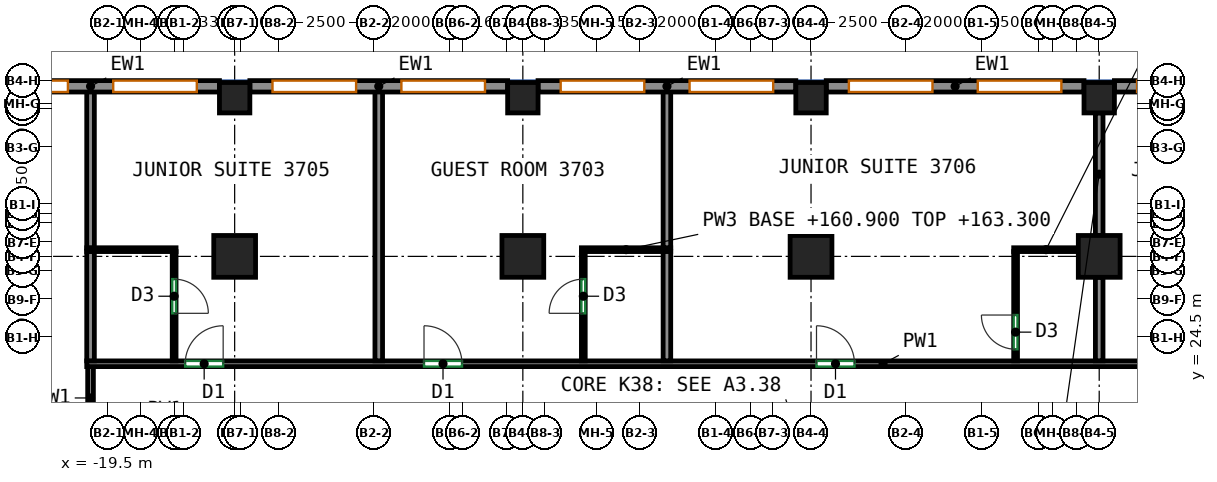
"""IFC4 building model, lengths in metres.
Left out: names, types, materials, properties, quantities, classifications, styles, units other than length and angle.
Written with IfcOpenShell. Run it as: python <this file> out.ifc"""

import sys

from ifc_helpers import new_model, si_unit, direction, frame, frame_2d, origin, origin_2d, place, context, subcontext, project, spatial, rectangle, extrude, source, transform, mapped, element, fill, save


model = new_model("IFC4")
c1 = context("Model", 3, precision=1e-05, world=origin(), true_north=direction((0.0, 1.0)))
c2 = subcontext(c1, "Body", "Model", "MODEL_VIEW")
j1 = project(units=[si_unit("LENGTHUNIT", "METRE"), si_unit("PLANEANGLEUNIT", "RADIAN")], contexts=[c1])
p1 = place(None, origin())
s1 = spatial("IfcSite", under=j1, at=p1, CompositionType="ELEMENT")
p2 = place(p1, origin())
s2 = spatial("IfcBuilding", under=s1, at=p2, CompositionType="ELEMENT")
p3 = place(p2, frame((0.0, 0.0, 160.9)))
s3 = spatial("IfcBuildingStorey", under=s2, at=p3, CompositionType="ELEMENT", Elevation=160.9)
m1 = source(origin(), c2, "Body", "SweptSolid", [
    extrude(rectangle(XDim=1.1, YDim=1.1, at=origin_2d()), origin(), (0.0, 0.0, 1.0), 3.0),
])
p4 = place(p3, frame((-16.167, 26.625, 0.0), z_axis=(0.0, 0.0, 1.0), x_axis=(1.0, 0.0, 0.0)))
e1 = element("IfcColumn", 1, at=p4, inside=s3, PredefinedType="COLUMN", context=c2, shape_type="MappedRepresentation", body=[
    mapped(m1, transform((0.0, 0.0, 0.0))),
])
m2 = source(origin(), c2, "Body", "SweptSolid", [
    extrude(rectangle(XDim=0.8, YDim=0.8, at=origin_2d()), origin(), (0.0, 0.0, 1.0), 3.0),
])
p5 = place(p3, frame((-16.167, 30.8, 0.0), z_axis=(0.0, 0.0, 1.0), x_axis=(1.0, 0.0, 0.0)))
e2 = element("IfcColumn", 2, at=p5, inside=s3, PredefinedType="COLUMN", context=c2, shape_type="MappedRepresentation", body=[
    mapped(m2, transform((0.0, 0.0, 0.0))),
])
p6 = place(p3, frame((-8.583, 26.625, 0.0), z_axis=(0.0, 0.0, 1.0), x_axis=(1.0, 0.0, 0.0)))
e3 = element("IfcColumn", 3, at=p6, inside=s3, PredefinedType="COLUMN", context=c2, shape_type="MappedRepresentation", body=[
    mapped(m1, transform((0.0, 0.0, 0.0))),
])
p7 = place(p3, frame((-8.583, 30.8, 0.0), z_axis=(0.0, 0.0, 1.0), x_axis=(1.0, 0.0, 0.0)))
e4 = element("IfcColumn", 4, at=p7, inside=s3, PredefinedType="COLUMN", context=c2, shape_type="MappedRepresentation", body=[
    mapped(m2, transform((0.0, 0.0, 0.0))),
])
p8 = place(p3, frame((-1.0, 26.625, 0.0), z_axis=(0.0, 0.0, 1.0), x_axis=(1.0, 0.0, 0.0)))
e5 = element("IfcColumn", 5, at=p8, inside=s3, PredefinedType="COLUMN", context=c2, shape_type="MappedRepresentation", body=[
    mapped(m1, transform((0.0, 0.0, 0.0))),
])
p9 = place(p3, frame((-1.0, 30.8, 0.0), z_axis=(0.0, 0.0, 1.0), x_axis=(1.0, 0.0, 0.0)))
e6 = element("IfcColumn", 6, at=p9, inside=s3, PredefinedType="COLUMN", context=c2, shape_type="MappedRepresentation", body=[
    mapped(m2, transform((0.0, 0.0, 0.0))),
])
p10 = place(p3, frame((6.583, 26.625, 0.0), z_axis=(0.0, 0.0, 1.0), x_axis=(1.0, 0.0, 0.0)))
e7 = element("IfcColumn", 7, at=p10, inside=s3, PredefinedType="COLUMN", context=c2, shape_type="MappedRepresentation", body=[
    mapped(m1, transform((0.0, 0.0, 0.0))),
])
p11 = place(p3, frame((6.583, 30.8, 0.0), z_axis=(0.0, 0.0, 1.0), x_axis=(1.0, 0.0, 0.0)))
e8 = element("IfcColumn", 8, at=p11, inside=s3, PredefinedType="COLUMN", context=c2, shape_type="MappedRepresentation", body=[
    mapped(m2, transform((0.0, 0.0, 0.0))),
])
m3 = source(origin(), c2, "Body", "SweptSolid", [
    extrude(rectangle(XDim=6.783, YDim=0.3, at=frame_2d((3.392, 0.0))), origin(), (0.0, 0.0, 1.0), 3.0),
])
p12 = place(p3, frame((13.767, 31.1, 0.0), z_axis=(0.0, 0.0, 1.0), x_axis=(-1.0, 0.0, 0.0)))
e9 = element("IfcWall", 9, at=p12, inside=s3, PredefinedType="SOLIDWALL", context=c2, shape_type="MappedRepresentation", body=[
    mapped(m3, transform((0.0, 0.0, 0.0))),
])
p13 = place(p12, frame((0.596, 0.0, 0.85)))
e10 = element("IfcOpeningElement", 10, at=p13, cuts=e9, PredefinedType="OPENING", context=c2, shape_type="SweptSolid", body=[
    extrude(rectangle(XDim=2.2, YDim=1.95, at=frame_2d((1.1, 0.975))), frame((0.0, 0.16, 0.0), z_axis=(0.0, -1.0, 0.0), x_axis=(1.0, 0.0, 0.0)), (0.0, 0.0, 1.0), 0.32),
])
p14 = place(p12, frame((3.988, 0.0, 0.85)))
e11 = element("IfcOpeningElement", 11, at=p14, cuts=e9, PredefinedType="OPENING", context=c2, shape_type="SweptSolid", body=[
    extrude(rectangle(XDim=2.2, YDim=1.95, at=frame_2d((1.1, 0.975))), frame((0.0, 0.16, 0.0), z_axis=(0.0, -1.0, 0.0), x_axis=(1.0, 0.0, 0.0)), (0.0, 0.0, 1.0), 0.32),
])
m4 = source(origin(), c2, "Body", "SweptSolid", [
    extrude(rectangle(XDim=6.783, YDim=0.3, at=frame_2d((3.392, 0.0))), origin(), (0.0, 0.0, 1.0), 3.0),
])
p15 = place(p3, frame((6.183, 31.1, 0.0), z_axis=(0.0, 0.0, 1.0), x_axis=(-1.0, 0.0, 0.0)))
e12 = element("IfcWall", 12, at=p15, inside=s3, PredefinedType="SOLIDWALL", context=c2, shape_type="MappedRepresentation", body=[
    mapped(m4, transform((0.0, 0.0, 0.0))),
])
p16 = place(p15, frame((0.596, 0.0, 0.85)))
e13 = element("IfcOpeningElement", 13, at=p16, cuts=e12, PredefinedType="OPENING", context=c2, shape_type="SweptSolid", body=[
    extrude(rectangle(XDim=2.2, YDim=1.95, at=frame_2d((1.1, 0.975))), frame((0.0, 0.16, 0.0), z_axis=(0.0, -1.0, 0.0), x_axis=(1.0, 0.0, 0.0)), (0.0, 0.0, 1.0), 0.32),
])
p17 = place(p15, frame((3.988, 0.0, 0.85)))
e14 = element("IfcOpeningElement", 14, at=p17, cuts=e12, PredefinedType="OPENING", context=c2, shape_type="SweptSolid", body=[
    extrude(rectangle(XDim=2.2, YDim=1.95, at=frame_2d((1.1, 0.975))), frame((0.0, 0.16, 0.0), z_axis=(0.0, -1.0, 0.0), x_axis=(1.0, 0.0, 0.0)), (0.0, 0.0, 1.0), 0.32),
])
p18 = place(p3, frame((-1.4, 31.1, 0.0), z_axis=(0.0, 0.0, 1.0), x_axis=(-1.0, 0.0, 0.0)))
e15 = element("IfcWall", 15, at=p18, inside=s3, PredefinedType="SOLIDWALL", context=c2, shape_type="MappedRepresentation", body=[
    mapped(m4, transform((0.0, 0.0, 0.0))),
])
p19 = place(p18, frame((0.596, 0.0, 0.85)))
e16 = element("IfcOpeningElement", 16, at=p19, cuts=e15, PredefinedType="OPENING", context=c2, shape_type="SweptSolid", body=[
    extrude(rectangle(XDim=2.2, YDim=1.95, at=frame_2d((1.1, 0.975))), frame((0.0, 0.16, 0.0), z_axis=(0.0, -1.0, 0.0), x_axis=(1.0, 0.0, 0.0)), (0.0, 0.0, 1.0), 0.32),
])
p20 = place(p18, frame((3.988, 0.0, 0.85)))
e17 = element("IfcOpeningElement", 17, at=p20, cuts=e15, PredefinedType="OPENING", context=c2, shape_type="SweptSolid", body=[
    extrude(rectangle(XDim=2.2, YDim=1.95, at=frame_2d((1.1, 0.975))), frame((0.0, 0.16, 0.0), z_axis=(0.0, -1.0, 0.0), x_axis=(1.0, 0.0, 0.0)), (0.0, 0.0, 1.0), 0.32),
])
p21 = place(p3, frame((-8.983, 31.1, 0.0), z_axis=(0.0, 0.0, 1.0), x_axis=(-1.0, 0.0, 0.0)))
e18 = element("IfcWall", 18, at=p21, inside=s3, PredefinedType="SOLIDWALL", context=c2, shape_type="MappedRepresentation", body=[
    mapped(m3, transform((0.0, 0.0, 0.0))),
])
p22 = place(p21, frame((0.596, 0.0, 0.85)))
e19 = element("IfcOpeningElement", 19, at=p22, cuts=e18, PredefinedType="OPENING", context=c2, shape_type="SweptSolid", body=[
    extrude(rectangle(XDim=2.2, YDim=1.95, at=frame_2d((1.1, 0.975))), frame((0.0, 0.16, 0.0), z_axis=(0.0, -1.0, 0.0), x_axis=(1.0, 0.0, 0.0)), (0.0, 0.0, 1.0), 0.32),
])
p23 = place(p21, frame((3.988, 0.0, 0.85)))
e20 = element("IfcOpeningElement", 20, at=p23, cuts=e18, PredefinedType="OPENING", context=c2, shape_type="SweptSolid", body=[
    extrude(rectangle(XDim=2.2, YDim=1.95, at=frame_2d((1.1, 0.975))), frame((0.0, 0.16, 0.0), z_axis=(0.0, -1.0, 0.0), x_axis=(1.0, 0.0, 0.0)), (0.0, 0.0, 1.0), 0.32),
])
p24 = place(p3, frame((-16.567, 31.1, 0.0), z_axis=(0.0, 0.0, 1.0), x_axis=(-1.0, 0.0, 0.0)))
e21 = element("IfcWall", 21, at=p24, inside=s3, PredefinedType="SOLIDWALL", context=c2, shape_type="MappedRepresentation", body=[
    mapped(m4, transform((0.0, 0.0, 0.0))),
])
p25 = place(p24, frame((0.596, 0.0, 0.85)))
e22 = element("IfcOpeningElement", 22, at=p25, cuts=e21, PredefinedType="OPENING", context=c2, shape_type="SweptSolid", body=[
    extrude(rectangle(XDim=2.2, YDim=1.95, at=frame_2d((1.1, 0.975))), frame((0.0, 0.16, 0.0), z_axis=(0.0, -1.0, 0.0), x_axis=(1.0, 0.0, 0.0)), (0.0, 0.0, 1.0), 0.32),
])
p26 = place(p24, frame((3.988, 0.0, 0.85)))
e23 = element("IfcOpeningElement", 23, at=p26, cuts=e21, PredefinedType="OPENING", context=c2, shape_type="SweptSolid", body=[
    extrude(rectangle(XDim=2.2, YDim=1.95, at=frame_2d((1.1, 0.975))), frame((0.0, 0.16, 0.0), z_axis=(0.0, -1.0, 0.0), x_axis=(1.0, 0.0, 0.0)), (0.0, 0.0, 1.0), 0.32),
])
p27 = place(p3, frame((-19.959, 22.075, 0.0), z_axis=(0.0, 0.0, 1.0), x_axis=(0.0, 1.0, 0.0)))
e24 = element("IfcWall", 24, at=p27, inside=s3, PredefinedType="PARTITIONING", context=c2, shape_type="SweptSolid", body=[
    extrude(rectangle(XDim=1.65, YDim=0.15, at=frame_2d((0.825, 0.0))), origin(), (0.0, 0.0, 1.0), 3.0),
])
p28 = place(p3, frame((-20.059, 23.8, 0.0), z_axis=(0.0, 0.0, 1.0), x_axis=(1.0, 0.0, 0.0)))
e25 = element("IfcWall", 25, at=p28, inside=s3, PredefinedType="PARTITIONING", context=c2, shape_type="SweptSolid", body=[
    extrude(rectangle(XDim=41.909, YDim=0.15, at=frame_2d((20.955, 0.0))), origin(), (0.0, 0.0, 1.0), 3.0),
])
p29 = place(p28, frame((2.59, 0.0, 0.0)))
e26 = element("IfcOpeningElement", 26, at=p29, cuts=e25, PredefinedType="OPENING", context=c2, shape_type="SweptSolid", body=[
    extrude(rectangle(XDim=1.0, YDim=2.1, at=frame_2d((0.5, 1.05))), frame((0.0, 0.085, 0.0), z_axis=(0.0, -1.0, 0.0), x_axis=(1.0, 0.0, 0.0)), (0.0, 0.0, 1.0), 0.17),
])
p30 = place(p28, frame((8.875, 0.0, 0.0)))
e27 = element("IfcOpeningElement", 27, at=p30, cuts=e25, PredefinedType="OPENING", context=c2, shape_type="SweptSolid", body=[
    extrude(rectangle(XDim=1.0, YDim=2.1, at=frame_2d((0.5, 1.05))), frame((0.0, 0.085, 0.0), z_axis=(0.0, -1.0, 0.0), x_axis=(1.0, 0.0, 0.0)), (0.0, 0.0, 1.0), 0.17),
])
p31 = place(p28, frame((19.203, 0.0, 0.0)))
e28 = element("IfcOpeningElement", 28, at=p31, cuts=e25, PredefinedType="OPENING", context=c2, shape_type="SweptSolid", body=[
    extrude(rectangle(XDim=1.0, YDim=2.1, at=frame_2d((0.5, 1.05))), frame((0.0, 0.085, 0.0), z_axis=(0.0, -1.0, 0.0), x_axis=(1.0, 0.0, 0.0)), (0.0, 0.0, 1.0), 0.17),
])
p32 = place(p28, frame((28.634, 0.0, 0.0)))
e29 = element("IfcOpeningElement", 29, at=p32, cuts=e25, PredefinedType="OPENING", context=c2, shape_type="SweptSolid", body=[
    extrude(rectangle(XDim=1.0, YDim=2.1, at=frame_2d((0.5, 1.05))), frame((0.0, 0.085, 0.0), z_axis=(0.0, -1.0, 0.0), x_axis=(1.0, 0.0, 0.0)), (0.0, 0.0, 1.0), 0.17),
])
p33 = place(p28, frame((36.616, 0.0, 0.0)))
e30 = element("IfcOpeningElement", 30, at=p33, cuts=e25, PredefinedType="OPENING", context=c2, shape_type="SweptSolid", body=[
    extrude(rectangle(XDim=1.0, YDim=2.1, at=frame_2d((0.5, 1.05))), frame((0.0, 0.085, 0.0), z_axis=(0.0, -1.0, 0.0), x_axis=(1.0, 0.0, 0.0)), (0.0, 0.0, 1.0), 0.17),
])
p34 = place(p28, frame((38.208, 0.0, 0.0)))
e31 = element("IfcOpeningElement", 31, at=p34, cuts=e25, PredefinedType="OPENING", context=c2, shape_type="SweptSolid", body=[
    extrude(rectangle(XDim=1.0, YDim=2.1, at=frame_2d((0.5, 1.05))), frame((0.0, 0.085, 0.0), z_axis=(0.0, -1.0, 0.0), x_axis=(1.0, 0.0, 0.0)), (0.0, 0.0, 1.0), 0.17),
])
p35 = place(p3, frame((-19.959, 26.842, 0.0), z_axis=(0.0, 0.0, 1.0), x_axis=(0.0, 1.0, 0.0)))
e32 = element("IfcWall", 32, at=p35, inside=s3, PredefinedType="PARTITIONING", context=c2, shape_type="SweptSolid", body=[
    extrude(rectangle(XDim=4.158, YDim=0.2, at=frame_2d((2.079, 0.0))), origin(), (0.0, 0.0, 1.0), 3.0),
])
p36 = place(p3, frame((-19.959, 23.877, 0.0), z_axis=(0.0, 0.0, 1.0), x_axis=(0.0, 1.0, 0.0)))
e33 = element("IfcWall", 33, at=p36, inside=s3, PredefinedType="PARTITIONING", context=c2, shape_type="SweptSolid", body=[
    extrude(rectangle(XDim=2.885, YDim=0.2, at=frame_2d((1.442, 0.0))), origin(), (0.0, 0.0, 1.0), 3.0),
])
p37 = place(p3, frame((-17.759, 26.752, 0.0), z_axis=(0.0, 0.0, 1.0), x_axis=(0.0, -1.0, 0.0)))
e34 = element("IfcWall", 34, at=p37, inside=s3, PredefinedType="PARTITIONING", context=c2, shape_type="SweptSolid", body=[
    extrude(rectangle(XDim=2.875, YDim=0.1, at=frame_2d((1.438, 0.0))), origin(), (0.0, 0.0, 1.0), 3.0),
])
p38 = place(p37, frame((0.725, 0.0, 0.0)))
e35 = element("IfcOpeningElement", 35, at=p38, cuts=e34, PredefinedType="OPENING", context=c2, shape_type="SweptSolid", body=[
    extrude(rectangle(XDim=0.9, YDim=2.1, at=frame_2d((0.45, 1.05))), frame((0.0, 0.06, 0.0), z_axis=(0.0, -1.0, 0.0), x_axis=(1.0, 0.0, 0.0)), (0.0, 0.0, 1.0), 0.12),
])
p39 = place(p3, frame((-20.059, 26.802, 0.0), z_axis=(0.0, 0.0, 1.0), x_axis=(1.0, 0.0, 0.0)))
e36 = element("IfcWall", 36, at=p39, inside=s3, PredefinedType="PARTITIONING", context=c2, shape_type="SweptSolid", body=[
    extrude(rectangle(XDim=2.35, YDim=0.1, at=frame_2d((1.175, 0.0))), origin(), (0.0, 0.0, 1.0), 3.0),
])
p40 = place(p3, frame((-12.375, 23.877, 0.0), z_axis=(0.0, 0.0, 1.0), x_axis=(0.0, 1.0, 0.0)))
e37 = element("IfcWall", 37, at=p40, inside=s3, PredefinedType="PARTITIONING", context=c2, shape_type="SweptSolid", body=[
    extrude(rectangle(XDim=7.123, YDim=0.2, at=frame_2d((3.562, 0.0))), origin(), (0.0, 0.0, 1.0), 3.0),
])
p41 = place(p3, frame((-7.042, 26.802, 0.0), z_axis=(0.0, 0.0, 1.0), x_axis=(1.0, 0.0, 0.0)))
e38 = element("IfcWall", 38, at=p41, inside=s3, PredefinedType="PARTITIONING", context=c2, shape_type="SweptSolid", body=[
    extrude(rectangle(XDim=2.35, YDim=0.1, at=frame_2d((1.175, 0.0))), origin(), (0.0, 0.0, 1.0), 2.4),
])
p42 = place(p3, frame((-6.992, 23.877, 0.0), z_axis=(0.0, 0.0, 1.0), x_axis=(0.0, 1.0, 0.0)))
e39 = element("IfcWall", 39, at=p42, inside=s3, PredefinedType="PARTITIONING", context=c2, shape_type="SweptSolid", body=[
    extrude(rectangle(XDim=2.875, YDim=0.1, at=frame_2d((1.438, 0.0))), origin(), (0.0, 0.0, 1.0), 3.0),
])
p43 = place(p42, frame((1.25, 0.0, 0.0)))
e40 = element("IfcOpeningElement", 40, at=p43, cuts=e39, PredefinedType="OPENING", context=c2, shape_type="SweptSolid", body=[
    extrude(rectangle(XDim=0.9, YDim=2.1, at=frame_2d((0.45, 1.05))), frame((0.0, 0.06, 0.0), z_axis=(0.0, -1.0, 0.0), x_axis=(1.0, 0.0, 0.0)), (0.0, 0.0, 1.0), 0.12),
])
p44 = place(p3, frame((-4.792, 26.852, 0.0), z_axis=(0.0, 0.0, 1.0), x_axis=(0.0, 1.0, 0.0)))
e41 = element("IfcWall", 41, at=p44, inside=s3, PredefinedType="PARTITIONING", context=c2, shape_type="SweptSolid", body=[
    extrude(rectangle(XDim=4.148, YDim=0.2, at=frame_2d((2.074, 0.0))), origin(), (0.0, 0.0, 1.0), 3.0),
])
p45 = place(p3, frame((-4.792, 23.877, 0.0), z_axis=(0.0, 0.0, 1.0), x_axis=(0.0, 1.0, 0.0)))
e42 = element("IfcWall", 42, at=p45, inside=s3, PredefinedType="PARTITIONING", context=c2, shape_type="SweptSolid", body=[
    extrude(rectangle(XDim=2.875, YDim=0.2, at=frame_2d((1.438, 0.0))), origin(), (0.0, 0.0, 1.0), 3.0),
])
p46 = place(p3, frame((4.333, 26.802, 0.0), z_axis=(0.0, 0.0, 1.0), x_axis=(1.0, 0.0, 0.0)))
e43 = element("IfcWall", 43, at=p46, inside=s3, PredefinedType="PARTITIONING", context=c2, shape_type="SweptSolid", body=[
    extrude(rectangle(XDim=1.7, YDim=0.1, at=frame_2d((0.85, 0.0))), origin(), (0.0, 0.0, 1.0), 2.4),
])
p47 = place(p3, frame((4.383, 23.877, 0.0), z_axis=(0.0, 0.0, 1.0), x_axis=(0.0, 1.0, 0.0)))
e44 = element("IfcWall", 44, at=p47, inside=s3, PredefinedType="PARTITIONING", context=c2, shape_type="SweptSolid", body=[
    extrude(rectangle(XDim=2.875, YDim=0.1, at=frame_2d((1.438, 0.0))), origin(), (0.0, 0.0, 1.0), 3.0),
])
p48 = place(p47, frame((0.305, 0.0, 0.0)))
e45 = element("IfcOpeningElement", 45, at=p48, cuts=e44, PredefinedType="OPENING", context=c2, shape_type="SweptSolid", body=[
    extrude(rectangle(XDim=0.9, YDim=2.1, at=frame_2d((0.45, 1.05))), frame((0.0, 0.06, 0.0), z_axis=(0.0, -1.0, 0.0), x_axis=(1.0, 0.0, 0.0)), (0.0, 0.0, 1.0), 0.12),
])
p49 = place(p3, frame((6.583, 27.175, 0.0), z_axis=(0.0, 0.0, 1.0), x_axis=(0.0, 1.0, 0.0)))
e46 = element("IfcWall", 46, at=p49, inside=s3, PredefinedType="PARTITIONING", context=c2, shape_type="SweptSolid", body=[
    extrude(rectangle(XDim=3.225, YDim=0.2, at=frame_2d((1.612, 0.0))), origin(), (0.0, 0.0, 1.0), 2.4),
])
p50 = place(p3, frame((6.583, 23.877, 0.0), z_axis=(0.0, 0.0, 1.0), x_axis=(0.0, 1.0, 0.0)))
e47 = element("IfcWall", 47, at=p50, inside=s3, PredefinedType="PARTITIONING", context=c2, shape_type="SweptSolid", body=[
    extrude(rectangle(XDim=2.198, YDim=0.2, at=frame_2d((1.099, 0.0))), origin(), (0.0, 0.0, 1.0), 3.0),
])
p51 = place(p14, origin())
e48 = element("IfcWindow", 48, at=p51, inside=s3, PartitioningType="SINGLE_PANEL", PredefinedType="WINDOW", context=c2, shape_type="SweptSolid", body=[
    extrude(rectangle(XDim=2.2, YDim=1.95, at=frame_2d((1.1, 0.975))), frame((0.0, 0.03, 0.0), z_axis=(0.0, -1.0, 0.0), x_axis=(1.0, 0.0, 0.0)), (0.0, 0.0, 1.0), 0.06),
])
fill(e11, e48)
p52 = place(p16, origin())
e49 = element("IfcWindow", 49, at=p52, inside=s3, PartitioningType="SINGLE_PANEL", PredefinedType="WINDOW", context=c2, shape_type="SweptSolid", body=[
    extrude(rectangle(XDim=2.2, YDim=1.95, at=frame_2d((1.1, 0.975))), frame((0.0, 0.03, 0.0), z_axis=(0.0, -1.0, 0.0), x_axis=(1.0, 0.0, 0.0)), (0.0, 0.0, 1.0), 0.06),
])
fill(e13, e49)
p53 = place(p17, origin())
e50 = element("IfcWindow", 50, at=p53, inside=s3, PartitioningType="SINGLE_PANEL", PredefinedType="WINDOW", context=c2, shape_type="SweptSolid", body=[
    extrude(rectangle(XDim=2.2, YDim=1.95, at=frame_2d((1.1, 0.975))), frame((0.0, 0.03, 0.0), z_axis=(0.0, -1.0, 0.0), x_axis=(1.0, 0.0, 0.0)), (0.0, 0.0, 1.0), 0.06),
])
fill(e14, e50)
p54 = place(p19, origin())
e51 = element("IfcWindow", 51, at=p54, inside=s3, PartitioningType="SINGLE_PANEL", PredefinedType="WINDOW", context=c2, shape_type="SweptSolid", body=[
    extrude(rectangle(XDim=2.2, YDim=1.95, at=frame_2d((1.1, 0.975))), frame((0.0, 0.03, 0.0), z_axis=(0.0, -1.0, 0.0), x_axis=(1.0, 0.0, 0.0)), (0.0, 0.0, 1.0), 0.06),
])
fill(e16, e51)
p55 = place(p20, origin())
e52 = element("IfcWindow", 52, at=p55, inside=s3, PartitioningType="SINGLE_PANEL", PredefinedType="WINDOW", context=c2, shape_type="SweptSolid", body=[
    extrude(rectangle(XDim=2.2, YDim=1.95, at=frame_2d((1.1, 0.975))), frame((0.0, 0.03, 0.0), z_axis=(0.0, -1.0, 0.0), x_axis=(1.0, 0.0, 0.0)), (0.0, 0.0, 1.0), 0.06),
])
fill(e17, e52)
p56 = place(p22, origin())
e53 = element("IfcWindow", 53, at=p56, inside=s3, PartitioningType="SINGLE_PANEL", PredefinedType="WINDOW", context=c2, shape_type="SweptSolid", body=[
    extrude(rectangle(XDim=2.2, YDim=1.95, at=frame_2d((1.1, 0.975))), frame((0.0, 0.03, 0.0), z_axis=(0.0, -1.0, 0.0), x_axis=(1.0, 0.0, 0.0)), (0.0, 0.0, 1.0), 0.06),
])
fill(e19, e53)
p57 = place(p23, origin())
e54 = element("IfcWindow", 54, at=p57, inside=s3, PartitioningType="SINGLE_PANEL", PredefinedType="WINDOW", context=c2, shape_type="SweptSolid", body=[
    extrude(rectangle(XDim=2.2, YDim=1.95, at=frame_2d((1.1, 0.975))), frame((0.0, 0.03, 0.0), z_axis=(0.0, -1.0, 0.0), x_axis=(1.0, 0.0, 0.0)), (0.0, 0.0, 1.0), 0.06),
])
fill(e20, e54)
p58 = place(p25, origin())
e55 = element("IfcWindow", 55, at=p58, inside=s3, PartitioningType="SINGLE_PANEL", PredefinedType="WINDOW", context=c2, shape_type="SweptSolid", body=[
    extrude(rectangle(XDim=2.2, YDim=1.95, at=frame_2d((1.1, 0.975))), frame((0.0, 0.03, 0.0), z_axis=(0.0, -1.0, 0.0), x_axis=(1.0, 0.0, 0.0)), (0.0, 0.0, 1.0), 0.06),
])
fill(e22, e55)
p59 = place(p26, origin())
e56 = element("IfcWindow", 56, at=p59, inside=s3, PartitioningType="SINGLE_PANEL", PredefinedType="WINDOW", context=c2, shape_type="SweptSolid", body=[
    extrude(rectangle(XDim=2.2, YDim=1.95, at=frame_2d((1.1, 0.975))), frame((0.0, 0.03, 0.0), z_axis=(0.0, -1.0, 0.0), x_axis=(1.0, 0.0, 0.0)), (0.0, 0.0, 1.0), 0.06),
])
fill(e23, e56)
p60 = place(p29, origin())
e57 = element("IfcDoor", 57, at=p60, inside=s3, OperationType="SINGLE_SWING_RIGHT", PredefinedType="DOOR", context=c2, shape_type="SweptSolid", body=[
    extrude(rectangle(XDim=1.0, YDim=2.1, at=frame_2d((0.5, 1.05))), frame((0.0, 0.025, 0.0), z_axis=(0.0, -1.0, 0.0), x_axis=(1.0, 0.0, 0.0)), (0.0, 0.0, 1.0), 0.05),
])
fill(e26, e57)
p61 = place(p30, origin())
e58 = element("IfcDoor", 58, at=p61, inside=s3, OperationType="SINGLE_SWING_LEFT", PredefinedType="DOOR", context=c2, shape_type="SweptSolid", body=[
    extrude(rectangle(XDim=1.0, YDim=2.1, at=frame_2d((0.5, 1.05))), frame((0.0, 0.025, 0.0), z_axis=(0.0, -1.0, 0.0), x_axis=(1.0, 0.0, 0.0)), (0.0, 0.0, 1.0), 0.05),
])
fill(e27, e58)
p62 = place(p31, origin())
e59 = element("IfcDoor", 59, at=p62, inside=s3, OperationType="SINGLE_SWING_LEFT", PredefinedType="DOOR", context=c2, shape_type="SweptSolid", body=[
    extrude(rectangle(XDim=1.0, YDim=2.1, at=frame_2d((0.5, 1.05))), frame((0.0, 0.025, 0.0), z_axis=(0.0, -1.0, 0.0), x_axis=(1.0, 0.0, 0.0)), (0.0, 0.0, 1.0), 0.05),
])
fill(e28, e59)
p63 = place(p48, origin())
e60 = element("IfcDoor", 60, at=p63, inside=s3, OperationType="SINGLE_SWING_RIGHT", PredefinedType="DOOR", context=c2, shape_type="SweptSolid", body=[
    extrude(rectangle(XDim=0.9, YDim=2.1, at=frame_2d((0.45, 1.05))), frame((0.0, 0.025, 0.0), z_axis=(0.0, -1.0, 0.0), x_axis=(1.0, 0.0, 0.0)), (0.0, 0.0, 1.0), 0.05),
])
fill(e45, e60)
p64 = place(p38, origin())
e61 = element("IfcDoor", 61, at=p64, inside=s3, OperationType="SINGLE_SWING_RIGHT", PredefinedType="DOOR", context=c2, shape_type="SweptSolid", body=[
    extrude(rectangle(XDim=0.9, YDim=2.1, at=frame_2d((0.45, 1.05))), frame((0.0, 0.025, 0.0), z_axis=(0.0, -1.0, 0.0), x_axis=(1.0, 0.0, 0.0)), (0.0, 0.0, 1.0), 0.05),
])
fill(e35, e61)
p65 = place(p43, origin())
e62 = element("IfcDoor", 62, at=p65, inside=s3, OperationType="SINGLE_SWING_LEFT", PredefinedType="DOOR", context=c2, shape_type="SweptSolid", body=[
    extrude(rectangle(XDim=0.9, YDim=2.1, at=frame_2d((0.45, 1.05))), frame((0.0, 0.025, 0.0), z_axis=(0.0, -1.0, 0.0), x_axis=(1.0, 0.0, 0.0)), (0.0, 0.0, 1.0), 0.05),
])
fill(e40, e62)
save(model, sys.argv[1])
